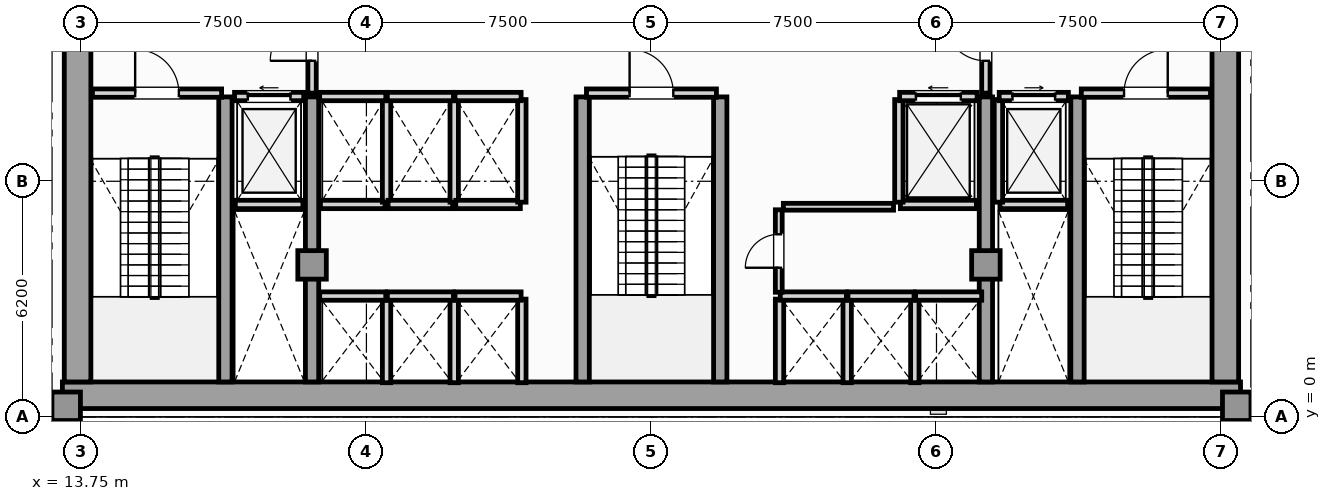
"""IFC4 building model, lengths in metres.
Left out: names, types, materials, properties, quantities, classifications, styles, units other than length and angle.
Written with IfcOpenShell. Run it as: python <this file> out.ifc"""

import sys

from ifc_helpers import new_model, si_unit, direction, frame, frame_2d, origin, origin_2d, place, context, subcontext, project, spatial, rectangle, extrude, element, fill, save


model = new_model("IFC4")
c1 = context("Model", 3, precision=1e-05, world=origin(), true_north=direction((0.0, 1.0)))
c2 = subcontext(c1, "Body", "Model", "MODEL_VIEW")
j1 = project(units=[si_unit("LENGTHUNIT", "METRE"), si_unit("PLANEANGLEUNIT", "RADIAN")], contexts=[c1])
p1 = place(None, origin())
s1 = spatial("IfcSite", under=j1, at=p1, CompositionType="ELEMENT")
p2 = place(p1, origin())
s2 = spatial("IfcBuilding", under=s1, at=p2, CompositionType="ELEMENT")
p3 = place(p2, frame((0.0, 0.0, 134.95)))
s3 = spatial("IfcBuildingStorey", under=s2, at=p3, CompositionType="ELEMENT", Elevation=134.95)
p4 = place(p3, frame((13.25, 0.57, 0.0), z_axis=(0.0, 0.0, 1.0), x_axis=(1.0, 0.0, 0.0)))
e1 = element("IfcWall", 1, at=p4, inside=s3, PredefinedType="SHEAR", context=c2, shape_type="SweptSolid", body=[
    extrude(rectangle(XDim=31.0, YDim=0.7, at=frame_2d((15.5, 0.0))), origin(), (0.0, 0.0, 1.0), 4.92),
])
for number, where, z_axis, x_axis in (
    (2, (13.65, 0.92, 0.0), (0.0, 0.0, 1.0), (0.0, 1.0, 0.0)),
    (3, (43.85, 0.92, 0.0), (0.0, 0.0, 1.0), (0.0, 1.0, 0.0)),
):
    element("IfcWall", number, at=place(p3, frame(where, z_axis=z_axis, x_axis=x_axis)), inside=s3, PredefinedType="SHEAR", context=c2, shape_type="SweptSolid", body=[
        extrude(rectangle(XDim=10.53, YDim=0.7, at=frame_2d((5.265, 0.0))), origin(), (0.0, 0.0, 1.0), 4.92),
    ])
for number, where, z_axis, x_axis in (
    (4, (17.54, 0.92, 0.0), (0.0, 0.0, 1.0), (0.0, 1.0, 0.0)),
    (5, (19.82, 0.92, 0.0), (0.0, 0.0, 1.0), (0.0, 1.0, 0.0)),
    (6, (26.94, 0.92, 0.0), (0.0, 0.0, 1.0), (0.0, 1.0, 0.0)),
    (7, (30.56, 0.92, 0.0), (0.0, 0.0, 1.0), (0.0, 1.0, 0.0)),
    (8, (37.55, 0.92, 0.0), (0.0, 0.0, 1.0), (0.0, 1.0, 0.0)),
    (9, (39.96, 0.92, 0.0), (0.0, 0.0, 1.0), (0.0, 1.0, 0.0)),
):
    element("IfcWall", number, at=place(p3, frame(where, z_axis=z_axis, x_axis=x_axis)), inside=s3, PredefinedType="SHEAR", context=c2, shape_type="SweptSolid", body=[
        extrude(rectangle(XDim=7.5, YDim=0.35, at=frame_2d((3.75, 0.0))), origin(), (0.0, 0.0, 1.0), 4.92),
    ])
for number, where, z_axis, x_axis in (
    (10, (13.35, 0.28, 0.0), (0.0, 0.0, 1.0), (1.0, 0.0, 0.0)),
    (11, (44.15, 0.28, 0.0), (0.0, 0.0, 1.0), (1.0, 0.0, 0.0)),
    (12, (19.82, 4.0, 0.0), (0.0, 0.0, 1.0), (1.0, 0.0, 0.0)),
    (13, (37.55, 4.0, 0.0), (0.0, 0.0, 1.0), (1.0, 0.0, 0.0)),
):
    element("IfcColumn", number, at=place(p3, frame(where, z_axis=z_axis, x_axis=x_axis)), inside=s3, PredefinedType="COLUMN", context=c2, shape_type="SweptSolid", body=[
        extrude(rectangle(XDim=0.75, YDim=0.75, at=origin_2d()), origin(), (0.0, 0.0, 1.0), 5.2),
    ])
for number, where, z_axis, x_axis in (
    (14, (5.84, 0.18, 0.0), (0.0, 0.0, 1.0), (1.0, 0.0, 0.0)),
    (15, (44.25, 0.18, 0.0), (0.0, 0.0, 1.0), (1.0, 0.0, 0.0)),
):
    element("IfcWall", number, at=place(p3, frame(where, z_axis=z_axis, x_axis=x_axis)), inside=s3, PredefinedType="SOLIDWALL", context=c2, shape_type="SweptSolid", body=[
        extrude(rectangle(XDim=7.41, YDim=0.3, at=frame_2d((3.705, 0.0))), origin(), (0.0, 0.0, 1.0), 4.92),
    ])
p5 = place(p3, frame((17.8, 5.59, 0.0), z_axis=(0.0, 0.0, 1.0), x_axis=(1.0, 0.0, 0.0)))
e16 = element("IfcWall", 16, at=p5, inside=s3, PredefinedType="SOLIDWALL", context=c2, shape_type="SweptSolid", body=[
    extrude(rectangle(XDim=1.78, YDim=0.22, at=frame_2d((0.89, 0.0))), origin(), (0.0, 0.0, 1.0), 4.92),
])
p6 = place(p3, frame((17.78, 8.43, 0.0), z_axis=(0.0, 0.0, 1.0), x_axis=(1.0, 0.0, 0.0)))
e17 = element("IfcWall", 17, at=p6, inside=s3, PredefinedType="SOLIDWALL", context=c2, shape_type="SweptSolid", body=[
    extrude(rectangle(XDim=1.82, YDim=0.22, at=frame_2d((0.91, 0.0))), origin(), (0.0, 0.0, 1.0), 4.92),
])
p7 = place(p6, frame((0.35, 0.0, 0.0)))
e18 = element("IfcOpeningElement", 18, at=p7, cuts=e17, PredefinedType="OPENING", context=c2, shape_type="SweptSolid", body=[
    extrude(rectangle(XDim=1.12, YDim=2.25, at=frame_2d((0.56, 1.125))), frame((0.0, 0.12, 0.0), z_axis=(0.0, -1.0, 0.0), x_axis=(1.0, 0.0, 0.0)), (0.0, 0.0, 1.0), 0.24),
])
p8 = place(p3, frame((37.92, 5.59, 0.0), z_axis=(0.0, 0.0, 1.0), x_axis=(1.0, 0.0, 0.0)))
e19 = element("IfcWall", 19, at=p8, inside=s3, PredefinedType="SOLIDWALL", context=c2, shape_type="SweptSolid", body=[
    extrude(rectangle(XDim=1.78, YDim=0.22, at=frame_2d((0.89, 0.0))), origin(), (0.0, 0.0, 1.0), 4.92),
])
p9 = place(p3, frame((37.88, 5.65, 0.0), z_axis=(0.0, 0.0, 1.0), x_axis=(0.0, 1.0, 0.0)))
e20 = element("IfcWall", 20, at=p9, inside=s3, PredefinedType="SOLIDWALL", context=c2, shape_type="SweptSolid", body=[
    extrude(rectangle(XDim=2.7, YDim=0.22, at=frame_2d((1.35, 0.0))), origin(), (0.0, 0.0, 1.0), 4.92),
])
p10 = place(p3, frame((37.9, 8.43, 0.0), z_axis=(0.0, 0.0, 1.0), x_axis=(1.0, 0.0, 0.0)))
e21 = element("IfcWall", 21, at=p10, inside=s3, PredefinedType="SOLIDWALL", context=c2, shape_type="SweptSolid", body=[
    extrude(rectangle(XDim=1.82, YDim=0.22, at=frame_2d((0.91, 0.0))), origin(), (0.0, 0.0, 1.0), 4.92),
])
p11 = place(p10, frame((0.35, 0.0, 0.0)))
e22 = element("IfcOpeningElement", 22, at=p11, cuts=e21, PredefinedType="OPENING", context=c2, shape_type="SweptSolid", body=[
    extrude(rectangle(XDim=1.12, YDim=2.25, at=frame_2d((0.56, 1.125))), frame((0.0, 0.12, 0.0), z_axis=(0.0, -1.0, 0.0), x_axis=(1.0, 0.0, 0.0)), (0.0, 0.0, 1.0), 0.24),
])
p12 = place(p3, frame((35.3, 5.59, 0.0), z_axis=(0.0, 0.0, 1.0), x_axis=(1.0, 0.0, 0.0)))
e23 = element("IfcWall", 23, at=p12, inside=s3, PredefinedType="SOLIDWALL", context=c2, shape_type="SweptSolid", body=[
    extrude(rectangle(XDim=2.0, YDim=0.22, at=frame_2d((1.0, 0.0))), origin(), (0.0, 0.0, 1.0), 4.92),
])
p13 = place(p3, frame((35.26, 5.65, 0.0), z_axis=(0.0, 0.0, 1.0), x_axis=(0.0, 1.0, 0.0)))
e24 = element("IfcWall", 24, at=p13, inside=s3, PredefinedType="SOLIDWALL", context=c2, shape_type="SweptSolid", body=[
    extrude(rectangle(XDim=2.7, YDim=0.22, at=frame_2d((1.35, 0.0))), origin(), (0.0, 0.0, 1.0), 4.92),
])
p14 = place(p3, frame((35.28, 8.43, 0.0), z_axis=(0.0, 0.0, 1.0), x_axis=(1.0, 0.0, 0.0)))
e25 = element("IfcWall", 25, at=p14, inside=s3, PredefinedType="SOLIDWALL", context=c2, shape_type="SweptSolid", body=[
    extrude(rectangle(XDim=2.04, YDim=0.22, at=frame_2d((1.02, 0.0))), origin(), (0.0, 0.0, 1.0), 4.92),
])
p15 = place(p14, frame((0.43, 0.0, 0.0)))
e26 = element("IfcOpeningElement", 26, at=p15, cuts=e25, PredefinedType="OPENING", context=c2, shape_type="SweptSolid", body=[
    extrude(rectangle(XDim=1.18, YDim=2.2, at=frame_2d((0.59, 1.1))), frame((0.0, 0.12, 0.0), z_axis=(0.0, -1.0, 0.0), x_axis=(1.0, 0.0, 0.0)), (0.0, 0.0, 1.0), 0.24),
])
p16 = place(p3, frame((21.78, 0.9, 0.0), z_axis=(0.0, 0.0, 1.0), x_axis=(0.0, 1.0, 0.0)))
e27 = element("IfcWall", 27, at=p16, inside=s3, PredefinedType="SOLIDWALL", context=c2, shape_type="SweptSolid", body=[
    extrude(rectangle(XDim=2.2, YDim=0.22, at=frame_2d((1.1, 0.0))), origin(), (0.0, 0.0, 1.0), 4.92),
])
p17 = place(p3, frame((20.02, 3.18, 0.0), z_axis=(0.0, 0.0, 1.0), x_axis=(1.0, 0.0, 0.0)))
e28 = element("IfcWall", 28, at=p17, inside=s3, PredefinedType="SOLIDWALL", context=c2, shape_type="SweptSolid", body=[
    extrude(rectangle(XDim=1.74, YDim=0.22, at=frame_2d((0.87, 0.0))), origin(), (0.0, 0.0, 1.0), 4.92),
])
p18 = place(p3, frame((23.56, 0.9, 0.0), z_axis=(0.0, 0.0, 1.0), x_axis=(0.0, 1.0, 0.0)))
e29 = element("IfcWall", 29, at=p18, inside=s3, PredefinedType="SOLIDWALL", context=c2, shape_type="SweptSolid", body=[
    extrude(rectangle(XDim=2.2, YDim=0.22, at=frame_2d((1.1, 0.0))), origin(), (0.0, 0.0, 1.0), 4.92),
])
p19 = place(p3, frame((21.8, 3.18, 0.0), z_axis=(0.0, 0.0, 1.0), x_axis=(1.0, 0.0, 0.0)))
e30 = element("IfcWall", 30, at=p19, inside=s3, PredefinedType="SOLIDWALL", context=c2, shape_type="SweptSolid", body=[
    extrude(rectangle(XDim=1.74, YDim=0.22, at=frame_2d((0.87, 0.0))), origin(), (0.0, 0.0, 1.0), 4.92),
])
p20 = place(p3, frame((25.34, 0.9, 0.0), z_axis=(0.0, 0.0, 1.0), x_axis=(0.0, 1.0, 0.0)))
e31 = element("IfcWall", 31, at=p20, inside=s3, PredefinedType="SOLIDWALL", context=c2, shape_type="SweptSolid", body=[
    extrude(rectangle(XDim=2.2, YDim=0.22, at=frame_2d((1.1, 0.0))), origin(), (0.0, 0.0, 1.0), 4.92),
])
p21 = place(p3, frame((23.58, 3.18, 0.0), z_axis=(0.0, 0.0, 1.0), x_axis=(1.0, 0.0, 0.0)))
e32 = element("IfcWall", 32, at=p21, inside=s3, PredefinedType="SOLIDWALL", context=c2, shape_type="SweptSolid", body=[
    extrude(rectangle(XDim=1.74, YDim=0.22, at=frame_2d((0.87, 0.0))), origin(), (0.0, 0.0, 1.0), 4.92),
])
for number, where, z_axis, x_axis in (
    (33, (32.12, 0.9, 0.0), (0.0, 0.0, 1.0), (0.0, 1.0, 0.0)),
    (34, (33.9, 0.9, 0.0), (0.0, 0.0, 1.0), (0.0, 1.0, 0.0)),
):
    element("IfcWall", number, at=place(p3, frame(where, z_axis=z_axis, x_axis=x_axis)), inside=s3, PredefinedType="SOLIDWALL", context=c2, shape_type="SweptSolid", body=[
        extrude(rectangle(XDim=2.2, YDim=0.22, at=frame_2d((1.1, 0.0))), origin(), (0.0, 0.0, 1.0), 4.92),
    ])
p22 = place(p3, frame((32.14, 3.18, 0.0), z_axis=(0.0, 0.0, 1.0), x_axis=(1.0, 0.0, 0.0)))
e35 = element("IfcWall", 35, at=p22, inside=s3, PredefinedType="SOLIDWALL", context=c2, shape_type="SweptSolid", body=[
    extrude(rectangle(XDim=1.74, YDim=0.22, at=frame_2d((0.87, 0.0))), origin(), (0.0, 0.0, 1.0), 4.92),
])
p23 = place(p3, frame((35.68, 0.9, 0.0), z_axis=(0.0, 0.0, 1.0), x_axis=(0.0, 1.0, 0.0)))
e36 = element("IfcWall", 36, at=p23, inside=s3, PredefinedType="SOLIDWALL", context=c2, shape_type="SweptSolid", body=[
    extrude(rectangle(XDim=2.2, YDim=0.22, at=frame_2d((1.1, 0.0))), origin(), (0.0, 0.0, 1.0), 4.92),
])
for number, where, z_axis, x_axis in (
    (37, (33.92, 3.18, 0.0), (0.0, 0.0, 1.0), (1.0, 0.0, 0.0)),
    (38, (35.7, 3.18, 0.0), (0.0, 0.0, 1.0), (1.0, 0.0, 0.0)),
):
    element("IfcWall", number, at=place(p3, frame(where, z_axis=z_axis, x_axis=x_axis)), inside=s3, PredefinedType="SOLIDWALL", context=c2, shape_type="SweptSolid", body=[
        extrude(rectangle(XDim=1.74, YDim=0.22, at=frame_2d((0.87, 0.0))), origin(), (0.0, 0.0, 1.0), 4.92),
    ])
p24 = place(p3, frame((20.04, 5.59, 0.0), z_axis=(0.0, 0.0, 1.0), x_axis=(1.0, 0.0, 0.0)))
e39 = element("IfcWall", 39, at=p24, inside=s3, PredefinedType="SOLIDWALL", context=c2, shape_type="SweptSolid", body=[
    extrude(rectangle(XDim=1.7, YDim=0.22, at=frame_2d((0.85, 0.0))), origin(), (0.0, 0.0, 1.0), 4.92),
])
p25 = place(p3, frame((21.78, 5.65, 0.0), z_axis=(0.0, 0.0, 1.0), x_axis=(0.0, 1.0, 0.0)))
e40 = element("IfcWall", 40, at=p25, inside=s3, PredefinedType="SOLIDWALL", context=c2, shape_type="SweptSolid", body=[
    extrude(rectangle(XDim=2.7, YDim=0.22, at=frame_2d((1.35, 0.0))), origin(), (0.0, 0.0, 1.0), 4.92),
])
p26 = place(p3, frame((20.02, 8.43, 0.0), z_axis=(0.0, 0.0, 1.0), x_axis=(1.0, 0.0, 0.0)))
e41 = element("IfcWall", 41, at=p26, inside=s3, PredefinedType="SOLIDWALL", context=c2, shape_type="SweptSolid", body=[
    extrude(rectangle(XDim=1.74, YDim=0.22, at=frame_2d((0.87, 0.0))), origin(), (0.0, 0.0, 1.0), 4.92),
])
p27 = place(p3, frame((21.82, 5.59, 0.0), z_axis=(0.0, 0.0, 1.0), x_axis=(1.0, 0.0, 0.0)))
e42 = element("IfcWall", 42, at=p27, inside=s3, PredefinedType="SOLIDWALL", context=c2, shape_type="SweptSolid", body=[
    extrude(rectangle(XDim=1.7, YDim=0.22, at=frame_2d((0.85, 0.0))), origin(), (0.0, 0.0, 1.0), 4.92),
])
p28 = place(p3, frame((23.56, 5.65, 0.0), z_axis=(0.0, 0.0, 1.0), x_axis=(0.0, 1.0, 0.0)))
e43 = element("IfcWall", 43, at=p28, inside=s3, PredefinedType="SOLIDWALL", context=c2, shape_type="SweptSolid", body=[
    extrude(rectangle(XDim=2.7, YDim=0.22, at=frame_2d((1.35, 0.0))), origin(), (0.0, 0.0, 1.0), 4.92),
])
p29 = place(p3, frame((21.8, 8.43, 0.0), z_axis=(0.0, 0.0, 1.0), x_axis=(1.0, 0.0, 0.0)))
e44 = element("IfcWall", 44, at=p29, inside=s3, PredefinedType="SOLIDWALL", context=c2, shape_type="SweptSolid", body=[
    extrude(rectangle(XDim=1.74, YDim=0.22, at=frame_2d((0.87, 0.0))), origin(), (0.0, 0.0, 1.0), 4.92),
])
p30 = place(p3, frame((23.6, 5.59, 0.0), z_axis=(0.0, 0.0, 1.0), x_axis=(1.0, 0.0, 0.0)))
e45 = element("IfcWall", 45, at=p30, inside=s3, PredefinedType="SOLIDWALL", context=c2, shape_type="SweptSolid", body=[
    extrude(rectangle(XDim=1.7, YDim=0.22, at=frame_2d((0.85, 0.0))), origin(), (0.0, 0.0, 1.0), 4.92),
])
p31 = place(p3, frame((25.34, 5.65, 0.0), z_axis=(0.0, 0.0, 1.0), x_axis=(0.0, 1.0, 0.0)))
e46 = element("IfcWall", 46, at=p31, inside=s3, PredefinedType="SOLIDWALL", context=c2, shape_type="SweptSolid", body=[
    extrude(rectangle(XDim=2.7, YDim=0.22, at=frame_2d((1.35, 0.0))), origin(), (0.0, 0.0, 1.0), 4.92),
])
p32 = place(p3, frame((23.58, 8.43, 0.0), z_axis=(0.0, 0.0, 1.0), x_axis=(1.0, 0.0, 0.0)))
e47 = element("IfcWall", 47, at=p32, inside=s3, PredefinedType="SOLIDWALL", context=c2, shape_type="SweptSolid", body=[
    extrude(rectangle(XDim=1.74, YDim=0.22, at=frame_2d((0.87, 0.0))), origin(), (0.0, 0.0, 1.0), 4.92),
])
p33 = place(p3, frame((14.04, 8.52, 0.0), z_axis=(0.0, 0.0, 1.0), x_axis=(1.0, 0.0, 0.0)))
e48 = element("IfcWall", 48, at=p33, inside=s3, PredefinedType="SOLIDWALL", context=c2, shape_type="SweptSolid", body=[
    extrude(rectangle(XDim=3.4, YDim=0.22, at=frame_2d((1.7, 0.0))), origin(), (0.0, 0.0, 1.0), 4.92),
])
p34 = place(p33, frame((1.125, 0.0, 0.0)))
e49 = element("IfcOpeningElement", 49, at=p34, cuts=e48, PredefinedType="OPENING", context=c2, shape_type="SweptSolid", body=[
    extrude(rectangle(XDim=1.15, YDim=2.2, at=frame_2d((0.575, 1.1))), frame((0.0, 0.12, 0.0), z_axis=(0.0, -1.0, 0.0), x_axis=(1.0, 0.0, 0.0)), (0.0, 0.0, 1.0), 0.24),
])
p35 = place(p3, frame((40.06, 8.52, 0.0), z_axis=(0.0, 0.0, 1.0), x_axis=(1.0, 0.0, 0.0)))
e50 = element("IfcWall", 50, at=p35, inside=s3, PredefinedType="SOLIDWALL", context=c2, shape_type="SweptSolid", body=[
    extrude(rectangle(XDim=3.4, YDim=0.22, at=frame_2d((1.7, 0.0))), origin(), (0.0, 0.0, 1.0), 4.92),
])
p36 = place(p35, frame((1.125, 0.0, 0.0)))
e51 = element("IfcOpeningElement", 51, at=p36, cuts=e50, PredefinedType="OPENING", context=c2, shape_type="SweptSolid", body=[
    extrude(rectangle(XDim=1.15, YDim=2.2, at=frame_2d((0.575, 1.1))), frame((0.0, 0.12, 0.0), z_axis=(0.0, -1.0, 0.0), x_axis=(1.0, 0.0, 0.0)), (0.0, 0.0, 1.0), 0.24),
])
p37 = place(p3, frame((27.04, 8.52, 0.0), z_axis=(0.0, 0.0, 1.0), x_axis=(1.0, 0.0, 0.0)))
e52 = element("IfcWall", 52, at=p37, inside=s3, PredefinedType="SOLIDWALL", context=c2, shape_type="SweptSolid", body=[
    extrude(rectangle(XDim=3.42, YDim=0.22, at=frame_2d((1.71, 0.0))), origin(), (0.0, 0.0, 1.0), 4.92),
])
p38 = place(p37, frame((1.135, 0.0, 0.0)))
e53 = element("IfcOpeningElement", 53, at=p38, cuts=e52, PredefinedType="OPENING", context=c2, shape_type="SweptSolid", body=[
    extrude(rectangle(XDim=1.15, YDim=2.2, at=frame_2d((0.575, 1.1))), frame((0.0, 0.12, 0.0), z_axis=(0.0, -1.0, 0.0), x_axis=(1.0, 0.0, 0.0)), (0.0, 0.0, 1.0), 0.24),
])
p39 = place(p3, frame((19.82, 8.52, 0.0), z_axis=(0.0, 0.0, 1.0), x_axis=(0.0, 1.0, 0.0)))
e54 = element("IfcWall", 54, at=p39, inside=s3, PredefinedType="SOLIDWALL", context=c2, shape_type="SweptSolid", body=[
    extrude(rectangle(XDim=2.8, YDim=0.22, at=frame_2d((1.4, 0.0))), origin(), (0.0, 0.0, 1.0), 4.375),
])
p40 = place(p39, frame((0.85, 0.0, 0.0)))
e55 = element("IfcOpeningElement", 55, at=p40, cuts=e54, PredefinedType="OPENING", context=c2, shape_type="SweptSolid", body=[
    extrude(rectangle(XDim=1.1, YDim=2.2, at=frame_2d((0.55, 1.1))), frame((0.0, 0.12, 0.0), z_axis=(0.0, -1.0, 0.0), x_axis=(1.0, 0.0, 0.0)), (0.0, 0.0, 1.0), 0.24),
])
p41 = place(p3, frame((37.55, 8.52, 0.0), z_axis=(0.0, 0.0, 1.0), x_axis=(0.0, 1.0, 0.0)))
e56 = element("IfcWall", 56, at=p41, inside=s3, PredefinedType="SOLIDWALL", context=c2, shape_type="SweptSolid", body=[
    extrude(rectangle(XDim=2.8, YDim=0.22, at=frame_2d((1.4, 0.0))), origin(), (0.0, 0.0, 1.0), 4.375),
])
p42 = place(p41, frame((0.85, 0.0, 0.0)))
e57 = element("IfcOpeningElement", 57, at=p42, cuts=e56, PredefinedType="OPENING", context=c2, shape_type="SweptSolid", body=[
    extrude(rectangle(XDim=1.1, YDim=2.2, at=frame_2d((0.55, 1.1))), frame((0.0, 0.12, 0.0), z_axis=(0.0, -1.0, 0.0), x_axis=(1.0, 0.0, 0.0)), (0.0, 0.0, 1.0), 0.24),
])
p43 = place(p3, frame((32.1, 3.28, 0.0), z_axis=(0.0, 0.0, 1.0), x_axis=(0.0, 1.0, 0.0)))
e58 = element("IfcWall", 58, at=p43, inside=s3, PredefinedType="PARTITIONING", context=c2, shape_type="SweptSolid", body=[
    extrude(rectangle(XDim=2.17, YDim=0.18, at=frame_2d((1.085, 0.0))), origin(), (0.0, 0.0, 1.0), 4.92),
])
p44 = place(p43, frame((0.645, 0.0, 0.0)))
e59 = element("IfcOpeningElement", 59, at=p44, cuts=e58, PredefinedType="OPENING", context=c2, shape_type="SweptSolid", body=[
    extrude(rectangle(XDim=0.88, YDim=2.05, at=frame_2d((0.44, 1.025))), frame((0.0, 0.1, 0.0), z_axis=(0.0, -1.0, 0.0), x_axis=(1.0, 0.0, 0.0)), (0.0, 0.0, 1.0), 0.2),
])
p45 = place(p3, frame((32.22, 5.53, 0.0), z_axis=(0.0, 0.0, 1.0), x_axis=(1.0, 0.0, 0.0)))
e60 = element("IfcWall", 60, at=p45, inside=s3, PredefinedType="PARTITIONING", context=c2, shape_type="SweptSolid", body=[
    extrude(rectangle(XDim=2.9, YDim=0.18, at=frame_2d((1.45, 0.0))), origin(), (0.0, 0.0, 1.0), 4.92),
])
p46 = place(p7, origin())
e61 = element("IfcDoor", 61, at=p46, inside=s3, OperationType="SLIDING_TO_LEFT", PredefinedType="DOOR", context=c2, shape_type="SweptSolid", body=[
    extrude(rectangle(XDim=1.12, YDim=2.25, at=frame_2d((0.56, 1.125))), frame((0.0, 0.025, 0.0), z_axis=(0.0, -1.0, 0.0), x_axis=(1.0, 0.0, 0.0)), (0.0, 0.0, 1.0), 0.05),
])
fill(e18, e61)
p47 = place(p11, origin())
e62 = element("IfcDoor", 62, at=p47, inside=s3, OperationType="SLIDING_TO_RIGHT", PredefinedType="DOOR", context=c2, shape_type="SweptSolid", body=[
    extrude(rectangle(XDim=1.12, YDim=2.25, at=frame_2d((0.56, 1.125))), frame((0.0, 0.025, 0.0), z_axis=(0.0, -1.0, 0.0), x_axis=(1.0, 0.0, 0.0)), (0.0, 0.0, 1.0), 0.05),
])
fill(e22, e62)
p48 = place(p15, origin())
e63 = element("IfcDoor", 63, at=p48, inside=s3, OperationType="SLIDING_TO_LEFT", PredefinedType="DOOR", context=c2, shape_type="SweptSolid", body=[
    extrude(rectangle(XDim=1.18, YDim=2.2, at=frame_2d((0.59, 1.1))), frame((0.0, 0.025, 0.0), z_axis=(0.0, -1.0, 0.0), x_axis=(1.0, 0.0, 0.0)), (0.0, 0.0, 1.0), 0.05),
])
fill(e26, e63)
p49 = place(p34, origin())
e64 = element("IfcDoor", 64, at=p49, inside=s3, OperationType="SINGLE_SWING_LEFT", PredefinedType="DOOR", context=c2, shape_type="SweptSolid", body=[
    extrude(rectangle(XDim=1.15, YDim=2.2, at=frame_2d((0.575, 1.1))), frame((0.0, 0.025, 0.0), z_axis=(0.0, -1.0, 0.0), x_axis=(1.0, 0.0, 0.0)), (0.0, 0.0, 1.0), 0.05),
])
fill(e49, e64)
p50 = place(p36, origin())
e65 = element("IfcDoor", 65, at=p50, inside=s3, OperationType="SINGLE_SWING_RIGHT", PredefinedType="DOOR", context=c2, shape_type="SweptSolid", body=[
    extrude(rectangle(XDim=1.15, YDim=2.2, at=frame_2d((0.575, 1.1))), frame((0.0, 0.025, 0.0), z_axis=(0.0, -1.0, 0.0), x_axis=(1.0, 0.0, 0.0)), (0.0, 0.0, 1.0), 0.05),
])
fill(e51, e65)
p51 = place(p38, origin())
e66 = element("IfcDoor", 66, at=p51, inside=s3, OperationType="SINGLE_SWING_LEFT", PredefinedType="DOOR", context=c2, shape_type="SweptSolid", body=[
    extrude(rectangle(XDim=1.15, YDim=2.2, at=frame_2d((0.575, 1.1))), frame((0.0, 0.025, 0.0), z_axis=(0.0, -1.0, 0.0), x_axis=(1.0, 0.0, 0.0)), (0.0, 0.0, 1.0), 0.05),
])
fill(e53, e66)
p52 = place(p40, origin())
e67 = element("IfcDoor", 67, at=p52, inside=s3, OperationType="SINGLE_SWING_LEFT", PredefinedType="DOOR", context=c2, shape_type="SweptSolid", body=[
    extrude(rectangle(XDim=1.1, YDim=2.2, at=frame_2d((0.55, 1.1))), frame((0.0, 0.025, 0.0), z_axis=(0.0, -1.0, 0.0), x_axis=(1.0, 0.0, 0.0)), (0.0, 0.0, 1.0), 0.05),
])
fill(e55, e67)
p53 = place(p42, origin())
e68 = element("IfcDoor", 68, at=p53, inside=s3, OperationType="SINGLE_SWING_RIGHT", PredefinedType="DOOR", context=c2, shape_type="SweptSolid", body=[
    extrude(rectangle(XDim=1.1, YDim=2.2, at=frame_2d((0.55, 1.1))), frame((0.0, 0.025, 0.0), z_axis=(0.0, -1.0, 0.0), x_axis=(1.0, 0.0, 0.0)), (0.0, 0.0, 1.0), 0.05),
])
fill(e57, e68)
p54 = place(p44, origin())
e69 = element("IfcDoor", 69, at=p54, inside=s3, OperationType="SINGLE_SWING_LEFT", PredefinedType="DOOR", context=c2, shape_type="SweptSolid", body=[
    extrude(rectangle(XDim=0.88, YDim=2.05, at=frame_2d((0.44, 1.025))), frame((0.0, 0.025, 0.0), z_axis=(0.0, -1.0, 0.0), x_axis=(1.0, 0.0, 0.0)), (0.0, 0.0, 1.0), 0.05),
])
fill(e59, e69)
save(model, sys.argv[1])
